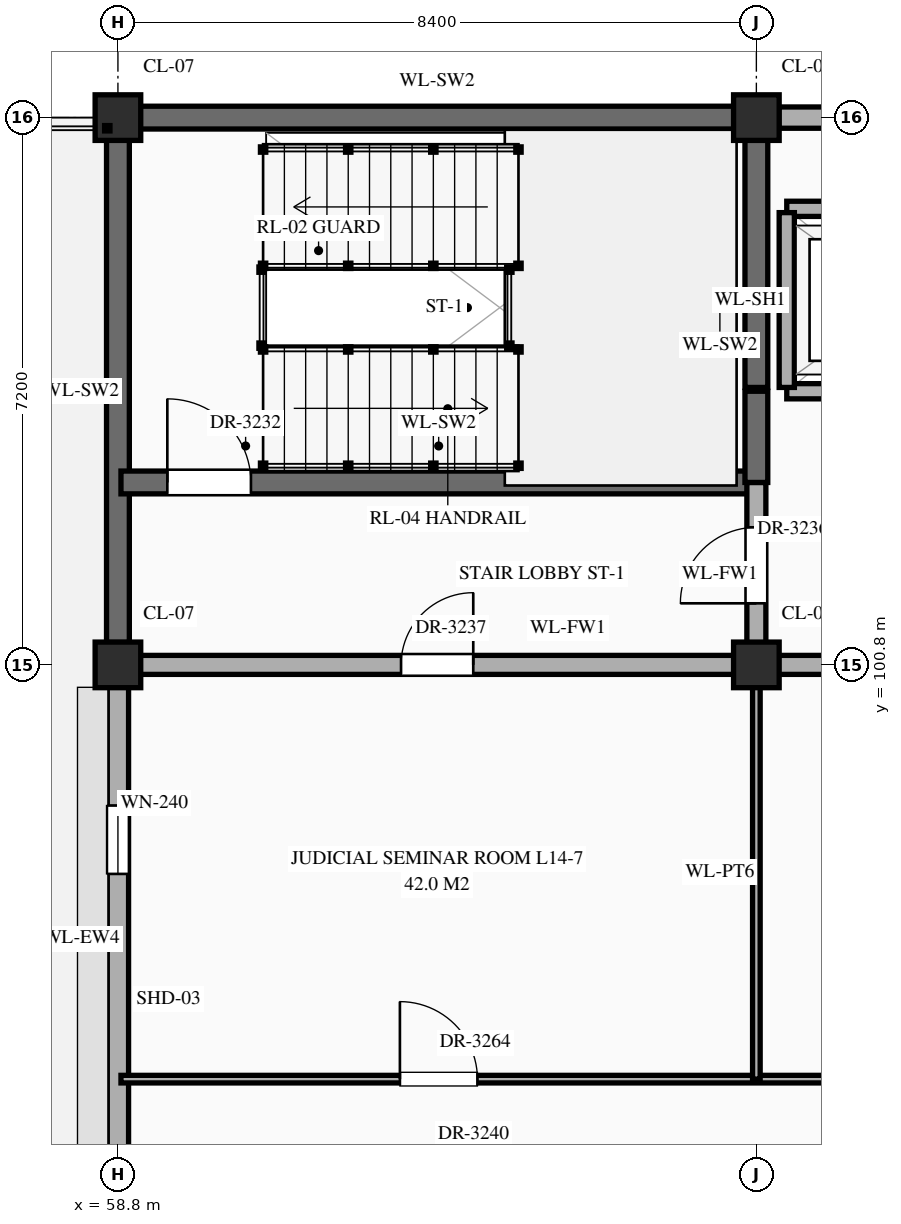
"""IFC4 building model, lengths in metres.
Left out: names, types, materials, properties, quantities, classifications, styles, units other than length and angle.
Written with IfcOpenShell. Run it as: python <this file> out.ifc"""

import sys

from ifc_helpers import new_model, si_unit, direction, frame, frame_2d, origin, origin_2d, place, context, subcontext, project, spatial, rectangle, extrude, element, fill, save


model = new_model("IFC4")
c1 = context("Model", 3, precision=1e-05, world=origin(), true_north=direction((0.0, 1.0)))
c2 = subcontext(c1, "Body", "Model", "MODEL_VIEW")
j1 = project(units=[si_unit("LENGTHUNIT", "METRE"), si_unit("PLANEANGLEUNIT", "RADIAN")], contexts=[c1])
p1 = place(None, origin())
s1 = spatial("IfcSite", under=j1, at=p1, CompositionType="ELEMENT")
p2 = place(p1, origin())
s2 = spatial("IfcBuilding", under=s1, at=p2, CompositionType="ELEMENT")
p3 = place(p2, frame((0.0, 0.0, 60.3)))
s3 = spatial("IfcBuildingStorey", under=s2, at=p3, CompositionType="ELEMENT", Elevation=60.3)
for number, where, z_axis, x_axis in (
    (1, (58.8, 100.8, 0.0), (0.0, 0.0, 1.0), (1.0, 0.0, 0.0)),
    (2, (58.8, 108.0, 0.0), (0.0, 0.0, 1.0), (1.0, 0.0, 0.0)),
    (3, (67.2, 100.8, 0.0), (0.0, 0.0, 1.0), (1.0, 0.0, 0.0)),
    (4, (67.2, 108.0, 0.0), (0.0, 0.0, 1.0), (1.0, 0.0, 0.0)),
):
    element("IfcColumn", number, at=place(p3, frame(where, z_axis=z_axis, x_axis=x_axis)), inside=s3, PredefinedType="COLUMN", context=c2, shape_type="SweptSolid", body=[
        extrude(rectangle(XDim=0.6, YDim=0.6, at=origin_2d()), origin(), (0.0, 0.0, 1.0), 4.2),
    ])
p4 = place(p3, frame((58.8, 93.895, 0.0), z_axis=(0.0, 0.0, 1.0), x_axis=(0.0, 1.0, 0.0)))
e5 = element("IfcWall", 5, at=p4, inside=s3, PredefinedType="STANDARD", context=c2, shape_type="SweptSolid", body=[
    extrude(rectangle(XDim=6.61, YDim=0.28, at=frame_2d((3.305, 0.0))), origin(), (0.0, 0.0, 1.0), 3.31),
])
p5 = place(p4, frame((4.155, 0.0, 0.85)))
e6 = element("IfcOpeningElement", 6, at=p5, cuts=e5, PredefinedType="OPENING", context=c2, shape_type="SweptSolid", body=[
    extrude(rectangle(XDim=0.9, YDim=1.92, at=frame_2d((0.45, 0.96))), frame((0.0, 0.152, 0.0), z_axis=(0.0, -1.0, 0.0), x_axis=(1.0, 0.0, 0.0)), (0.0, 0.0, 1.0), 0.304),
])
p6 = place(p3, frame((59.095, 108.0, 0.0), z_axis=(0.0, 0.0, 1.0), x_axis=(1.0, 0.0, 0.0)))
e7 = element("IfcWall", 7, at=p6, inside=s3, PredefinedType="SHEAR", context=c2, shape_type="SweptSolid", body=[
    extrude(rectangle(XDim=7.81, YDim=0.3, at=frame_2d((3.905, 0.0))), origin(), (0.0, 0.0, 1.0), 3.96),
])
p7 = place(p3, frame((58.8, 101.095, 0.0), z_axis=(0.0, 0.0, 1.0), x_axis=(0.0, 1.0, 0.0)))
e8 = element("IfcWall", 8, at=p7, inside=s3, PredefinedType="SHEAR", context=c2, shape_type="SweptSolid", body=[
    extrude(rectangle(XDim=6.61, YDim=0.3, at=frame_2d((3.305, 0.0))), origin(), (0.0, 0.0, 1.0), 3.96),
])
p8 = place(p3, frame((67.495, 108.0, 0.0), z_axis=(0.0, 0.0, 1.0), x_axis=(1.0, 0.0, 0.0)))
e9 = element("IfcWall", 9, at=p8, inside=s3, PredefinedType="STANDARD", context=c2, shape_type="SweptSolid", body=[
    extrude(rectangle(XDim=7.81, YDim=0.28, at=frame_2d((3.905, 0.0))), origin(), (0.0, 0.0, 1.0), 3.31),
])
p9 = place(p3, frame((58.84, 95.35, 0.0), z_axis=(0.0, 0.0, 1.0), x_axis=(1.0, 0.0, 0.0)))
e10 = element("IfcWall", 10, at=p9, inside=s3, PredefinedType="STANDARD", context=c2, shape_type="SweptSolid", body=[
    extrude(rectangle(XDim=50.32, YDim=0.1, at=frame_2d((25.16, 0.0))), origin(), (0.0, 0.0, 1.0), 3.96),
])
p10 = place(p9, frame((3.67, 0.0, 0.0)))
e11 = element("IfcOpeningElement", 11, at=p10, cuts=e10, PredefinedType="OPENING", context=c2, shape_type="SweptSolid", body=[
    extrude(rectangle(XDim=1.02, YDim=2.4, at=frame_2d((0.51, 1.2))), frame((0.0, 0.062, 0.0), z_axis=(0.0, -1.0, 0.0), x_axis=(1.0, 0.0, 0.0)), (0.0, 0.0, 1.0), 0.124),
])
p11 = place(p9, frame((9.53, 0.0, 0.0)))
e12 = element("IfcOpeningElement", 12, at=p11, cuts=e10, PredefinedType="OPENING", context=c2, shape_type="SweptSolid", body=[
    extrude(rectangle(XDim=1.06, YDim=2.4, at=frame_2d((0.53, 1.2))), frame((0.0, 0.062, 0.0), z_axis=(0.0, -1.0, 0.0), x_axis=(1.0, 0.0, 0.0)), (0.0, 0.0, 1.0), 0.124),
])
p12 = place(p9, frame((12.39, 0.0, 0.0)))
e13 = element("IfcOpeningElement", 13, at=p12, cuts=e10, PredefinedType="OPENING", context=c2, shape_type="SweptSolid", body=[
    extrude(rectangle(XDim=1.14, YDim=2.4, at=frame_2d((0.57, 1.2))), frame((0.0, 0.062, 0.0), z_axis=(0.0, -1.0, 0.0), x_axis=(1.0, 0.0, 0.0)), (0.0, 0.0, 1.0), 0.124),
])
p13 = place(p9, frame((15.01, 0.0, 0.0)))
e14 = element("IfcOpeningElement", 14, at=p13, cuts=e10, PredefinedType="OPENING", context=c2, shape_type="SweptSolid", body=[
    extrude(rectangle(XDim=0.9, YDim=2.15, at=frame_2d((0.45, 1.075))), frame((0.0, 0.062, 0.0), z_axis=(0.0, -1.0, 0.0), x_axis=(1.0, 0.0, 0.0)), (0.0, 0.0, 1.0), 0.124),
])
p14 = place(p9, frame((20.53, 0.0, 0.0)))
e15 = element("IfcOpeningElement", 15, at=p14, cuts=e10, PredefinedType="OPENING", context=c2, shape_type="SweptSolid", body=[
    extrude(rectangle(XDim=0.86, YDim=2.1, at=frame_2d((0.43, 1.05))), frame((0.0, 0.062, 0.0), z_axis=(0.0, -1.0, 0.0), x_axis=(1.0, 0.0, 0.0)), (0.0, 0.0, 1.0), 0.124),
])
p15 = place(p9, frame((28.84, 0.0, 0.0)))
e16 = element("IfcOpeningElement", 16, at=p15, cuts=e10, PredefinedType="OPENING", context=c2, shape_type="SweptSolid", body=[
    extrude(rectangle(XDim=1.04, YDim=2.2, at=frame_2d((0.52, 1.1))), frame((0.0, 0.062, 0.0), z_axis=(0.0, -1.0, 0.0), x_axis=(1.0, 0.0, 0.0)), (0.0, 0.0, 1.0), 0.124),
])
p16 = place(p9, frame((34.72, 0.0, 0.0)))
e17 = element("IfcOpeningElement", 17, at=p16, cuts=e10, PredefinedType="OPENING", context=c2, shape_type="SweptSolid", body=[
    extrude(rectangle(XDim=1.08, YDim=2.25, at=frame_2d((0.54, 1.125))), frame((0.0, 0.062, 0.0), z_axis=(0.0, -1.0, 0.0), x_axis=(1.0, 0.0, 0.0)), (0.0, 0.0, 1.0), 0.124),
])
p17 = place(p9, frame((37.6, 0.0, 0.0)))
e18 = element("IfcOpeningElement", 18, at=p17, cuts=e10, PredefinedType="OPENING", context=c2, shape_type="SweptSolid", body=[
    extrude(rectangle(XDim=1.12, YDim=2.25, at=frame_2d((0.56, 1.125))), frame((0.0, 0.062, 0.0), z_axis=(0.0, -1.0, 0.0), x_axis=(1.0, 0.0, 0.0)), (0.0, 0.0, 1.0), 0.124),
])
p18 = place(p9, frame((40.08, 0.0, 0.0)))
e19 = element("IfcOpeningElement", 19, at=p18, cuts=e10, PredefinedType="OPENING", context=c2, shape_type="SweptSolid", body=[
    extrude(rectangle(XDim=1.16, YDim=2.3, at=frame_2d((0.58, 1.15))), frame((0.0, 0.062, 0.0), z_axis=(0.0, -1.0, 0.0), x_axis=(1.0, 0.0, 0.0)), (0.0, 0.0, 1.0), 0.124),
])
p19 = place(p9, frame((45.54, 0.0, 0.0)))
e20 = element("IfcOpeningElement", 20, at=p19, cuts=e10, PredefinedType="OPENING", context=c2, shape_type="SweptSolid", body=[
    extrude(rectangle(XDim=1.2, YDim=2.35, at=frame_2d((0.6, 1.175))), frame((0.0, 0.062, 0.0), z_axis=(0.0, -1.0, 0.0), x_axis=(1.0, 0.0, 0.0)), (0.0, 0.0, 1.0), 0.124),
])
p20 = place(p3, frame((58.84, 100.8, 0.0), z_axis=(0.0, 0.0, 1.0), x_axis=(1.0, 0.0, 0.0)))
e21 = element("IfcWall", 21, at=p20, inside=s3, PredefinedType="STANDARD", context=c2, shape_type="SweptSolid", body=[
    extrude(rectangle(XDim=11.76, YDim=0.25, at=frame_2d((5.88, 0.0))), origin(), (0.0, 0.0, 1.0), 3.11),
])
p21 = place(p20, frame((3.685, 0.0, 0.0)))
e22 = element("IfcOpeningElement", 22, at=p21, cuts=e21, PredefinedType="OPENING", context=c2, shape_type="SweptSolid", body=[
    extrude(rectangle(XDim=0.95, YDim=2.15, at=frame_2d((0.475, 1.075))), frame((0.0, 0.137, 0.0), z_axis=(0.0, -1.0, 0.0), x_axis=(1.0, 0.0, 0.0)), (0.0, 0.0, 1.0), 0.274),
])
p22 = place(p3, frame((58.84, 103.2, 0.0), z_axis=(0.0, 0.0, 1.0), x_axis=(1.0, 0.0, 0.0)))
e23 = element("IfcWall", 23, at=p22, inside=s3, PredefinedType="SHEAR", context=c2, shape_type="SweptSolid", body=[
    extrude(rectangle(XDim=8.36, YDim=0.3, at=frame_2d((4.18, 0.0))), origin(), (0.0, 0.0, 1.0), 3.96),
])
p23 = place(p22, frame((0.61, 0.0, 0.0)))
e24 = element("IfcOpeningElement", 24, at=p23, cuts=e23, PredefinedType="OPENING", context=c2, shape_type="SweptSolid", body=[
    extrude(rectangle(XDim=1.1, YDim=2.2, at=frame_2d((0.55, 1.1))), frame((0.0, 0.162, 0.0), z_axis=(0.0, -1.0, 0.0), x_axis=(1.0, 0.0, 0.0)), (0.0, 0.0, 1.0), 0.324),
])
p24 = place(p3, frame((67.6, 104.4, 0.0), z_axis=(0.0, 0.0, 1.0), x_axis=(1.0, 0.0, 0.0)))
e25 = element("IfcWall", 25, at=p24, inside=s3, PredefinedType="STANDARD", context=c2, shape_type="SweptSolid", body=[
    extrude(rectangle(XDim=3.0, YDim=0.2, at=frame_2d((1.5, 0.0))), origin(), (0.0, 0.0, 1.0), 3.96),
])
p25 = place(p24, frame((0.9, 0.0, 0.0)))
e26 = element("IfcOpeningElement", 26, at=p25, cuts=e25, PredefinedType="OPENING", context=c2, shape_type="SweptSolid", body=[
    extrude(rectangle(XDim=1.2, YDim=2.15, at=frame_2d((0.6, 1.075))), frame((0.0, 0.112, 0.0), z_axis=(0.0, -1.0, 0.0), x_axis=(1.0, 0.0, 0.0)), (0.0, 0.0, 1.0), 0.224),
])
p26 = place(p3, frame((67.6, 106.8, 0.0), z_axis=(0.0, 0.0, 1.0), x_axis=(1.0, 0.0, 0.0)))
e27 = element("IfcWall", 27, at=p26, inside=s3, PredefinedType="STANDARD", context=c2, shape_type="SweptSolid", body=[
    extrude(rectangle(XDim=3.0, YDim=0.2, at=frame_2d((1.5, 0.0))), origin(), (0.0, 0.0, 1.0), 3.96),
])
p27 = place(p3, frame((67.2, 95.35, 0.0), z_axis=(0.0, 0.0, 1.0), x_axis=(0.0, 1.0, 0.0)))
e28 = element("IfcWall", 28, at=p27, inside=s3, PredefinedType="STANDARD", context=c2, shape_type="SweptSolid", body=[
    extrude(rectangle(XDim=5.45, YDim=0.1, at=frame_2d((2.725, 0.0))), origin(), (0.0, 0.0, 1.0), 3.21),
])
p28 = place(p3, frame((67.2, 100.8, 0.0), z_axis=(0.0, 0.0, 1.0), x_axis=(0.0, 1.0, 0.0)))
e29 = element("IfcWall", 29, at=p28, inside=s3, PredefinedType="STANDARD", context=c2, shape_type="SweptSolid", body=[
    extrude(rectangle(XDim=2.4, YDim=0.25, at=frame_2d((1.2, 0.0))), origin(), (0.0, 0.0, 1.0), 3.21),
])
p29 = place(p28, frame((0.81, 0.0, 0.0)))
e30 = element("IfcOpeningElement", 30, at=p29, cuts=e29, PredefinedType="OPENING", context=c2, shape_type="SweptSolid", body=[
    extrude(rectangle(XDim=1.0, YDim=2.2, at=frame_2d((0.5, 1.1))), frame((0.0, 0.137, 0.0), z_axis=(0.0, -1.0, 0.0), x_axis=(1.0, 0.0, 0.0)), (0.0, 0.0, 1.0), 0.274),
])
p30 = place(p3, frame((67.2, 103.2, 0.0), z_axis=(0.0, 0.0, 1.0), x_axis=(0.0, 1.0, 0.0)))
e31 = element("IfcWall", 31, at=p30, inside=s3, PredefinedType="SHEAR", context=c2, shape_type="SweptSolid", body=[
    extrude(rectangle(XDim=1.2, YDim=0.3, at=frame_2d((0.6, 0.0))), origin(), (0.0, 0.0, 1.0), 3.96),
])
p31 = place(p3, frame((67.2, 104.45, 0.0), z_axis=(0.0, 0.0, 1.0), x_axis=(0.0, 1.0, 0.0)))
e32 = element("IfcWall", 32, at=p31, inside=s3, PredefinedType="SHEAR", context=c2, shape_type="SweptSolid", body=[
    extrude(rectangle(XDim=3.46, YDim=0.3, at=frame_2d((1.73, 0.0))), origin(), (0.0, 0.0, 1.0), 3.96),
])
p32 = place(p3, frame((67.6, 104.45, 0.0), z_axis=(0.0, 0.0, 1.0), x_axis=(0.0, 1.0, 0.0)))
e33 = element("IfcWall", 33, at=p32, inside=s3, PredefinedType="STANDARD", context=c2, shape_type="SweptSolid", body=[
    extrude(rectangle(XDim=2.3, YDim=0.2, at=frame_2d((1.15, 0.0))), origin(), (0.0, 0.0, 1.0), 3.96),
])
p33 = place(p5, origin())
e34 = element("IfcWindow", 34, at=p33, inside=s3, PartitioningType="SINGLE_PANEL", PredefinedType="WINDOW", context=c2, shape_type="SweptSolid", body=[
    extrude(rectangle(XDim=0.9, YDim=1.92, at=frame_2d((0.45, 0.96))), frame((0.0, 0.03, 0.0), z_axis=(0.0, -1.0, 0.0), x_axis=(1.0, 0.0, 0.0)), (0.0, 0.0, 1.0), 0.06),
])
fill(e6, e34)
p34 = place(p23, origin())
e35 = element("IfcDoor", 35, at=p34, inside=s3, OperationType="SINGLE_SWING_LEFT", PredefinedType="DOOR", context=c2, shape_type="SweptSolid", body=[
    extrude(rectangle(XDim=1.1, YDim=2.2, at=frame_2d((0.55, 1.1))), frame((0.0, 0.025, 0.0), z_axis=(0.0, -1.0, 0.0), x_axis=(1.0, 0.0, 0.0)), (0.0, 0.0, 1.0), 0.05),
])
fill(e24, e35)
p35 = place(p29, origin())
e36 = element("IfcDoor", 36, at=p35, inside=s3, OperationType="SINGLE_SWING_LEFT", PredefinedType="DOOR", context=c2, shape_type="SweptSolid", body=[
    extrude(rectangle(XDim=1.0, YDim=2.2, at=frame_2d((0.5, 1.1))), frame((0.0, 0.025, 0.0), z_axis=(0.0, -1.0, 0.0), x_axis=(1.0, 0.0, 0.0)), (0.0, 0.0, 1.0), 0.05),
])
fill(e30, e36)
p36 = place(p21, origin())
e37 = element("IfcDoor", 37, at=p36, inside=s3, OperationType="SINGLE_SWING_RIGHT", PredefinedType="DOOR", context=c2, shape_type="SweptSolid", body=[
    extrude(rectangle(XDim=0.95, YDim=2.15, at=frame_2d((0.475, 1.075))), frame((0.0, 0.025, 0.0), z_axis=(0.0, -1.0, 0.0), x_axis=(1.0, 0.0, 0.0)), (0.0, 0.0, 1.0), 0.05),
])
fill(e22, e37)
p37 = place(p10, origin())
e38 = element("IfcDoor", 38, at=p37, inside=s3, OperationType="SINGLE_SWING_LEFT", PredefinedType="DOOR", context=c2, shape_type="SweptSolid", body=[
    extrude(rectangle(XDim=1.02, YDim=2.4, at=frame_2d((0.51, 1.2))), frame((0.0, 0.025, 0.0), z_axis=(0.0, -1.0, 0.0), x_axis=(1.0, 0.0, 0.0)), (0.0, 0.0, 1.0), 0.05),
])
fill(e11, e38)
save(model, sys.argv[1])
